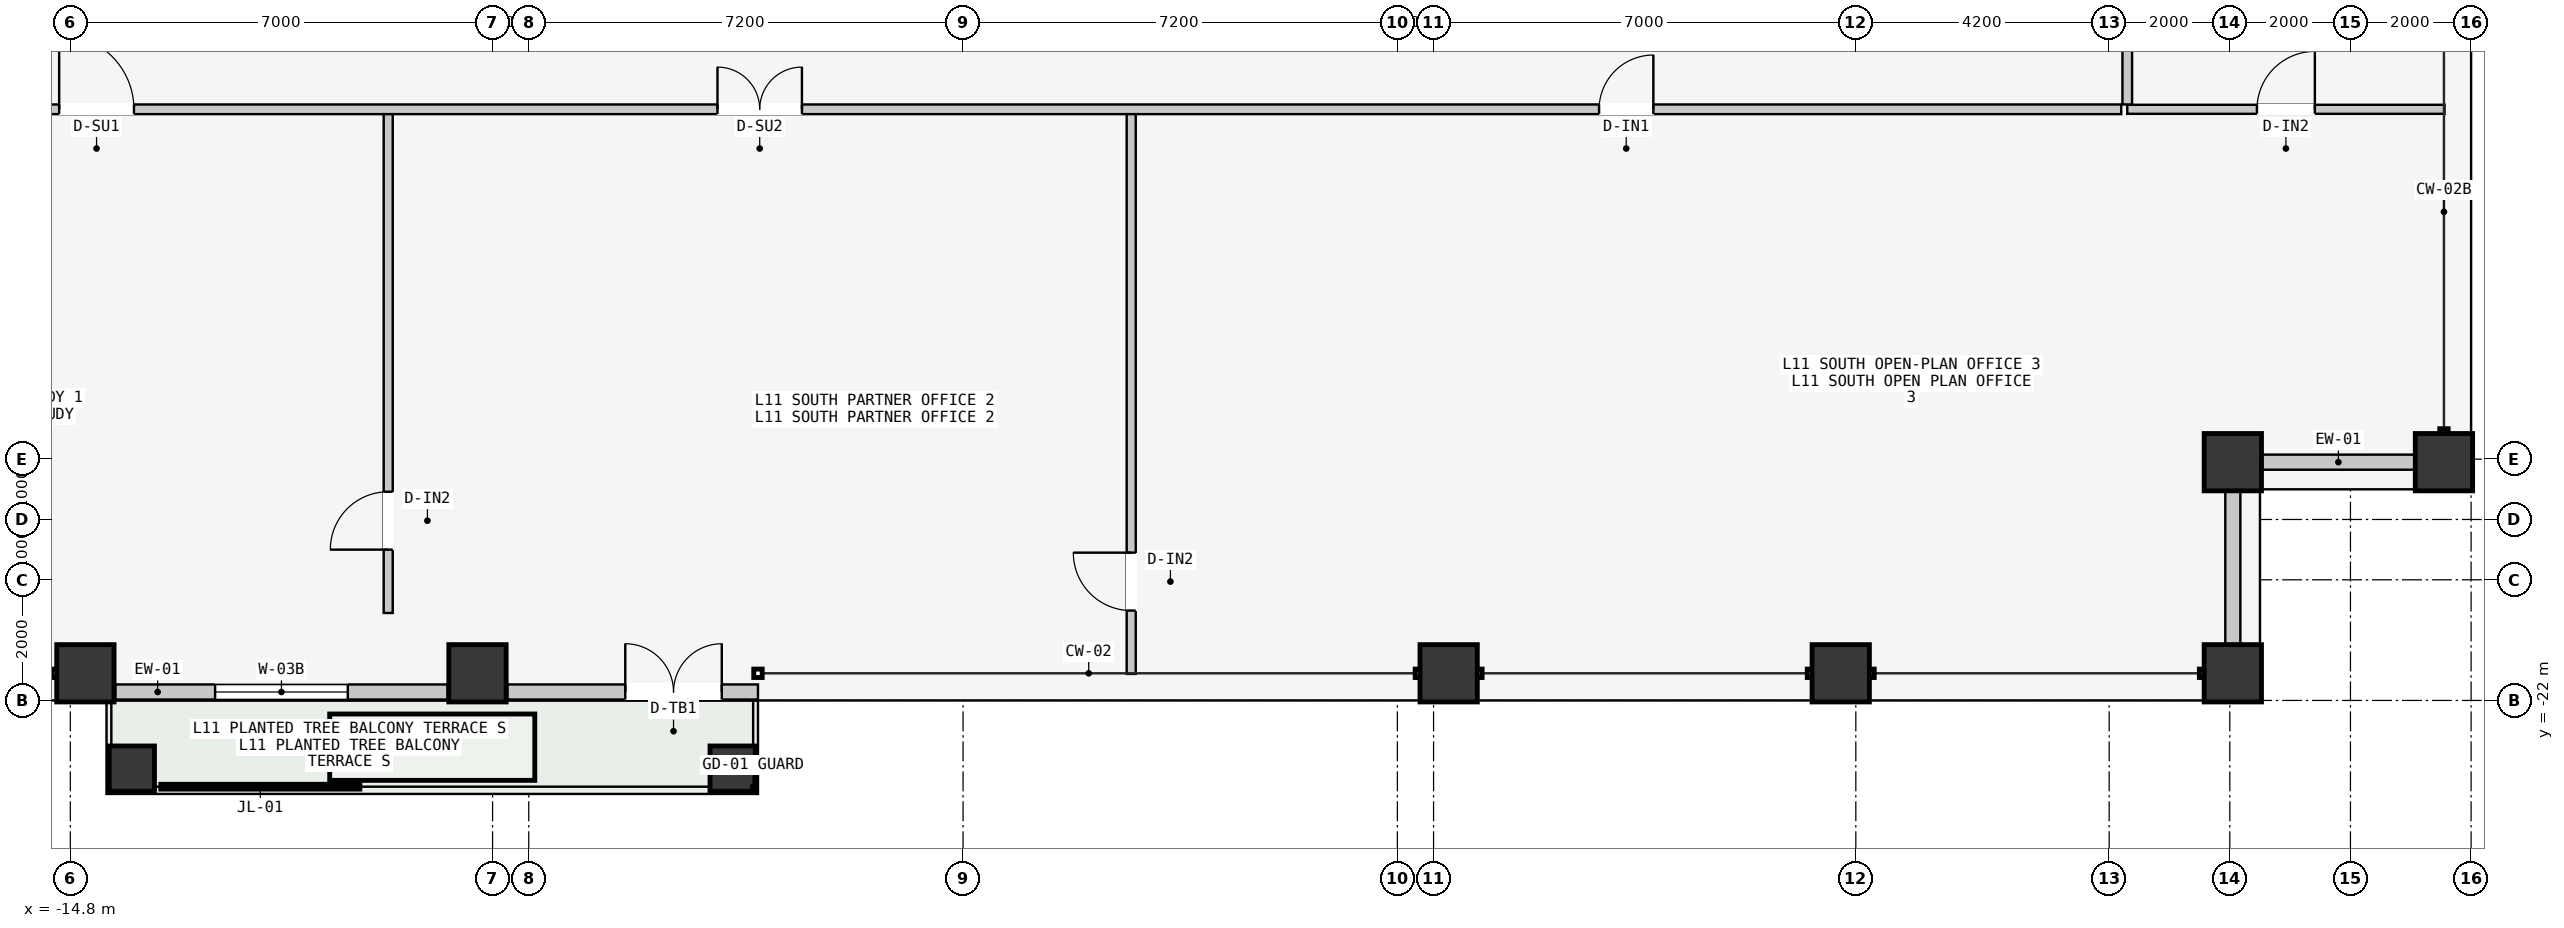
"""IFC4 building model, lengths in metres.
Left out: names, types, materials, properties, quantities, classifications, styles, units other than length and angle.
Written with IfcOpenShell. Run it as: python <this file> out.ifc"""

import sys

from ifc_helpers import new_model, si_unit, direction, frame, frame_2d, origin, origin_2d, place, context, subcontext, project, spatial, rectangle, hollow_rectangle, extrude, element, fill, save


model = new_model("IFC4")
c1 = context("Model", 3, precision=1e-05, world=origin(), true_north=direction((0.0, 1.0)))
c2 = subcontext(c1, "Body", "Model", "MODEL_VIEW")
j1 = project(units=[si_unit("LENGTHUNIT", "METRE"), si_unit("PLANEANGLEUNIT", "RADIAN")], contexts=[c1])
p1 = place(None, origin())
s1 = spatial("IfcSite", under=j1, at=p1, CompositionType="ELEMENT")
p2 = place(p1, origin())
s2 = spatial("IfcBuilding", under=s1, at=p2, CompositionType="ELEMENT")
p3 = place(p2, frame((0.0, 0.0, 45.6)))
s3 = spatial("IfcBuildingStorey", under=s2, at=p3, CompositionType="ELEMENT", Elevation=45.6)
for number, where, z_axis, x_axis in (
    (1, (-14.55, -21.55, 0.0), (0.0, 0.0, 1.0), (1.0, 0.0, 0.0)),
    (2, (-8.05, -21.55, 0.0), (0.0, 0.0, 1.0), (1.0, 0.0, 0.0)),
    (3, (8.05, -21.55, 0.0), (0.0, 0.0, 1.0), (1.0, 0.0, 0.0)),
    (4, (14.55, -21.55, 0.0), (0.0, 0.0, 1.0), (1.0, 0.0, 0.0)),
    (5, (21.05, -21.55, 0.0), (0.0, 0.0, 1.0), (1.0, 0.0, 0.0)),
    (6, (24.55, -18.05, 0.0), (0.0, 0.0, 1.0), (0.0, 1.0, 0.0)),
    (7, (21.05, -18.05, 0.0), (0.0, 0.0, 1.0), (1.0, 0.0, 0.0)),
):
    element("IfcColumn", number, at=place(p3, frame(where, z_axis=z_axis, x_axis=x_axis)), inside=s3, PredefinedType="COLUMN", context=c2, shape_type="SweptSolid", body=[
        extrude(hollow_rectangle(XDim=0.95, YDim=0.95, WallThickness=0.048, at=origin_2d()), origin(), (0.0, 0.0, 1.0), 3.6),
    ])
for number, where, z_axis, x_axis in (
    (8, (-13.78, -23.13, 0.0), (0.0, 0.0, 1.0), (1.0, 0.0, 0.0)),
    (9, (-3.82, -23.13, 0.0), (0.0, 0.0, 1.0), (1.0, 0.0, 0.0)),
):
    element("IfcColumn", number, at=place(p3, frame(where, z_axis=z_axis, x_axis=x_axis)), inside=s3, PredefinedType="COLUMN", context=c2, shape_type="SweptSolid", body=[
        extrude(hollow_rectangle(XDim=0.75, YDim=0.75, WallThickness=0.032, at=origin_2d()), origin(), (0.0, 0.0, 1.0), 3.6),
    ])
p4 = place(p3, frame((-14.055, -21.86, 0.0), z_axis=(0.0, 0.0, 1.0), x_axis=(1.0, 0.0, 0.0)))
e10 = element("IfcWall", 10, at=p4, inside=s3, PredefinedType="STANDARD", context=c2, shape_type="SweptSolid", body=[
    extrude(rectangle(XDim=5.51, YDim=0.25, at=frame_2d((2.755, 0.0))), origin(), (0.0, 0.0, 1.0), 3.4),
])
p5 = place(p4, frame((1.655, 0.0, 0.85)))
e11 = element("IfcOpeningElement", 11, at=p5, cuts=e10, PredefinedType="OPENING", context=c2, shape_type="SweptSolid", body=[
    extrude(rectangle(XDim=2.2, YDim=2.1, at=frame_2d((1.1, 1.05))), frame((0.0, 0.135, 0.0), z_axis=(0.0, -1.0, 0.0), x_axis=(1.0, 0.0, 0.0)), (0.0, 0.0, 1.0), 0.27),
])
p6 = place(p3, frame((-7.555, -21.86, 0.0), z_axis=(0.0, 0.0, 1.0), x_axis=(1.0, 0.0, 0.0)))
e12 = element("IfcWall", 12, at=p6, inside=s3, PredefinedType="STANDARD", context=c2, shape_type="SweptSolid", body=[
    extrude(rectangle(XDim=4.155, YDim=0.25, at=frame_2d((2.078, 0.0))), origin(), (0.0, 0.0, 1.0), 3.4),
])
p7 = place(p6, frame((1.955, 0.0, 0.0)))
e13 = element("IfcOpeningElement", 13, at=p7, cuts=e12, PredefinedType="OPENING", context=c2, shape_type="SweptSolid", body=[
    extrude(rectangle(XDim=1.6, YDim=2.2, at=frame_2d((0.8, 1.1))), frame((0.0, 0.135, 0.0), z_axis=(0.0, -1.0, 0.0), x_axis=(1.0, 0.0, 0.0)), (0.0, 0.0, 1.0), 0.27),
])
for number, where, z_axis, x_axis in (
    (14, (21.535, -18.05, 0.0), (0.0, 0.0, 1.0), (1.0, 0.0, 0.0)),
    (15, (21.05, -21.065, 0.0), (0.0, 0.0, 1.0), (0.0, 1.0, 0.0)),
):
    element("IfcWall", number, at=place(p3, frame(where, z_axis=z_axis, x_axis=x_axis)), inside=s3, PredefinedType="STANDARD", context=c2, shape_type="SweptSolid", body=[
        extrude(rectangle(XDim=2.53, YDim=0.25, at=frame_2d((1.265, 0.0))), origin(), (0.0, 0.0, 1.0), 2.7),
    ])
p8 = place(p3, frame((-9.53, -20.55, 0.0), z_axis=(0.0, 0.0, 1.0), x_axis=(0.0, 1.0, 0.0)))
e16 = element("IfcWall", 16, at=p8, inside=s3, PredefinedType="PARTITIONING", context=c2, shape_type="SweptSolid", body=[
    extrude(rectangle(XDim=8.29, YDim=0.15, at=frame_2d((4.145, 0.0))), origin(), (0.0, 0.0, 1.0), 3.4),
])
p9 = place(p8, frame((1.05, 0.0, 0.0)))
e17 = element("IfcOpeningElement", 17, at=p9, cuts=e16, PredefinedType="OPENING", context=c2, shape_type="SweptSolid", body=[
    extrude(rectangle(XDim=0.96, YDim=2.18, at=frame_2d((0.48, 1.09))), frame((0.0, 0.085, 0.0), z_axis=(0.0, -1.0, 0.0), x_axis=(1.0, 0.0, 0.0)), (0.0, 0.0, 1.0), 0.17),
])
p10 = place(p3, frame((2.787, -21.56, 0.0), z_axis=(0.0, 0.0, 1.0), x_axis=(0.0, 1.0, 0.0)))
e18 = element("IfcWall", 18, at=p10, inside=s3, PredefinedType="PARTITIONING", context=c2, shape_type="SweptSolid", body=[
    extrude(rectangle(XDim=9.3, YDim=0.15, at=frame_2d((4.65, 0.0))), origin(), (0.0, 0.0, 1.0), 3.4),
])
p11 = place(p10, frame((1.05, 0.0, 0.0)))
e19 = element("IfcOpeningElement", 19, at=p11, cuts=e18, PredefinedType="OPENING", context=c2, shape_type="SweptSolid", body=[
    extrude(rectangle(XDim=0.96, YDim=2.18, at=frame_2d((0.48, 1.09))), frame((0.0, 0.085, 0.0), z_axis=(0.0, -1.0, 0.0), x_axis=(1.0, 0.0, 0.0)), (0.0, 0.0, 1.0), 0.17),
])
p12 = place(p3, frame((-19.2, -12.2, 0.0), z_axis=(0.0, 0.0, 1.0), x_axis=(1.0, 0.0, 0.0)))
e20 = element("IfcWall", 20, at=p12, inside=s3, PredefinedType="PARTITIONING", context=c2, shape_type="SweptSolid", body=[
    extrude(rectangle(XDim=38.4, YDim=0.16, at=frame_2d((19.2, 0.0))), origin(), (0.0, 0.0, 1.0), 3.4),
])
p13 = place(p12, frame((4.215, 0.0, 0.0)))
e21 = element("IfcOpeningElement", 21, at=p13, cuts=e20, PredefinedType="OPENING", context=c2, shape_type="SweptSolid", body=[
    extrude(rectangle(XDim=1.24, YDim=2.24, at=frame_2d((0.62, 1.12))), frame((0.0, 0.09, 0.0), z_axis=(0.0, -1.0, 0.0), x_axis=(1.0, 0.0, 0.0)), (0.0, 0.0, 1.0), 0.18),
])
p14 = place(p12, frame((15.129, 0.0, 0.0)))
e22 = element("IfcOpeningElement", 22, at=p14, cuts=e20, PredefinedType="OPENING", context=c2, shape_type="SweptSolid", body=[
    extrude(rectangle(XDim=1.4, YDim=2.2, at=frame_2d((0.7, 1.1))), frame((0.0, 0.09, 0.0), z_axis=(0.0, -1.0, 0.0), x_axis=(1.0, 0.0, 0.0)), (0.0, 0.0, 1.0), 0.18),
])
p15 = place(p12, frame((29.744, 0.0, 0.0)))
e23 = element("IfcOpeningElement", 23, at=p15, cuts=e20, PredefinedType="OPENING", context=c2, shape_type="SweptSolid", body=[
    extrude(rectangle(XDim=0.9, YDim=2.15, at=frame_2d((0.45, 1.075))), frame((0.0, 0.09, 0.0), z_axis=(0.0, -1.0, 0.0), x_axis=(1.0, 0.0, 0.0)), (0.0, 0.0, 1.0), 0.18),
])
p16 = place(p3, frame((19.3, -12.2, 0.0), z_axis=(0.0, 0.0, 1.0), x_axis=(1.0, 0.0, 0.0)))
e24 = element("IfcWall", 24, at=p16, inside=s3, PredefinedType="PARTITIONING", context=c2, shape_type="SweptSolid", body=[
    extrude(rectangle(XDim=5.26, YDim=0.15, at=frame_2d((2.63, 0.0))), origin(), (0.0, 0.0, 1.0), 3.4),
])
p17 = place(p16, frame((2.15, 0.0, 0.0)))
e25 = element("IfcOpeningElement", 25, at=p17, cuts=e24, PredefinedType="OPENING", context=c2, shape_type="SweptSolid", body=[
    extrude(rectangle(XDim=0.96, YDim=2.18, at=frame_2d((0.48, 1.09))), frame((0.0, 0.085, 0.0), z_axis=(0.0, -1.0, 0.0), x_axis=(1.0, 0.0, 0.0)), (0.0, 0.0, 1.0), 0.17),
])
p18 = place(p3, frame((19.3, -12.12, 0.0), z_axis=(0.0, 0.0, 1.0), x_axis=(0.0, 1.0, 0.0)))
e26 = element("IfcWall", 26, at=p18, inside=s3, PredefinedType="PARTITIONING", context=c2, shape_type="SweptSolid", body=[
    extrude(rectangle(XDim=26.54, YDim=0.16, at=frame_2d((13.27, 0.0))), origin(), (0.0, 0.0, 1.0), 3.4),
])
p19 = place(p18, frame((5.063, 0.0, 0.0)))
e27 = element("IfcOpeningElement", 27, at=p19, cuts=e26, PredefinedType="OPENING", context=c2, shape_type="SweptSolid", body=[
    extrude(rectangle(XDim=1.02, YDim=2.2, at=frame_2d((0.51, 1.1))), frame((0.0, 0.09, 0.0), z_axis=(0.0, -1.0, 0.0), x_axis=(1.0, 0.0, 0.0)), (0.0, 0.0, 1.0), 0.18),
])
p20 = place(p18, frame((18.313, 0.0, 0.0)))
e28 = element("IfcOpeningElement", 28, at=p20, cuts=e26, PredefinedType="OPENING", context=c2, shape_type="SweptSolid", body=[
    extrude(rectangle(XDim=1.06, YDim=2.2, at=frame_2d((0.53, 1.1))), frame((0.0, 0.09, 0.0), z_axis=(0.0, -1.0, 0.0), x_axis=(1.0, 0.0, 0.0)), (0.0, 0.0, 1.0), 0.18),
])
p21 = place(p5, origin())
e29 = element("IfcWindow", 29, at=p21, inside=s3, PartitioningType="SINGLE_PANEL", PredefinedType="WINDOW", context=c2, shape_type="SweptSolid", body=[
    extrude(rectangle(XDim=2.2, YDim=2.1, at=frame_2d((1.1, 1.05))), frame((0.0, 0.03, 0.0), z_axis=(0.0, -1.0, 0.0), x_axis=(1.0, 0.0, 0.0)), (0.0, 0.0, 1.0), 0.06),
])
fill(e11, e29)
p22 = place(p7, origin())
e30 = element("IfcDoor", 30, at=p22, inside=s3, OperationType="DOUBLE_DOOR_SINGLE_SWING", PredefinedType="DOOR", context=c2, shape_type="SweptSolid", body=[
    extrude(rectangle(XDim=1.6, YDim=2.2, at=frame_2d((0.8, 1.1))), frame((0.0, 0.025, 0.0), z_axis=(0.0, -1.0, 0.0), x_axis=(1.0, 0.0, 0.0)), (0.0, 0.0, 1.0), 0.05),
])
fill(e13, e30)
p23 = place(p9, origin())
e31 = element("IfcDoor", 31, at=p23, inside=s3, OperationType="SINGLE_SWING_LEFT", PredefinedType="DOOR", context=c2, shape_type="SweptSolid", body=[
    extrude(rectangle(XDim=0.96, YDim=2.18, at=frame_2d((0.48, 1.09))), frame((0.0, 0.025, 0.0), z_axis=(0.0, -1.0, 0.0), x_axis=(1.0, 0.0, 0.0)), (0.0, 0.0, 1.0), 0.05),
])
fill(e17, e31)
p24 = place(p11, origin())
e32 = element("IfcDoor", 32, at=p24, inside=s3, OperationType="SINGLE_SWING_RIGHT", PredefinedType="DOOR", context=c2, shape_type="SweptSolid", body=[
    extrude(rectangle(XDim=0.96, YDim=2.18, at=frame_2d((0.48, 1.09))), frame((0.0, 0.025, 0.0), z_axis=(0.0, -1.0, 0.0), x_axis=(1.0, 0.0, 0.0)), (0.0, 0.0, 1.0), 0.05),
])
fill(e19, e32)
p25 = place(p13, origin())
e33 = element("IfcDoor", 33, at=p25, inside=s3, OperationType="SINGLE_SWING_LEFT", PredefinedType="DOOR", context=c2, shape_type="SweptSolid", body=[
    extrude(rectangle(XDim=1.24, YDim=2.24, at=frame_2d((0.62, 1.12))), frame((0.0, 0.025, 0.0), z_axis=(0.0, -1.0, 0.0), x_axis=(1.0, 0.0, 0.0)), (0.0, 0.0, 1.0), 0.05),
])
fill(e21, e33)
p26 = place(p14, origin())
e34 = element("IfcDoor", 34, at=p26, inside=s3, OperationType="DOUBLE_DOOR_SINGLE_SWING", PredefinedType="DOOR", context=c2, shape_type="SweptSolid", body=[
    extrude(rectangle(XDim=1.4, YDim=2.2, at=frame_2d((0.7, 1.1))), frame((0.0, 0.025, 0.0), z_axis=(0.0, -1.0, 0.0), x_axis=(1.0, 0.0, 0.0)), (0.0, 0.0, 1.0), 0.05),
])
fill(e22, e34)
p27 = place(p15, origin())
e35 = element("IfcDoor", 35, at=p27, inside=s3, OperationType="SINGLE_SWING_RIGHT", PredefinedType="DOOR", context=c2, shape_type="SweptSolid", body=[
    extrude(rectangle(XDim=0.9, YDim=2.15, at=frame_2d((0.45, 1.075))), frame((0.0, 0.025, 0.0), z_axis=(0.0, -1.0, 0.0), x_axis=(1.0, 0.0, 0.0)), (0.0, 0.0, 1.0), 0.05),
])
fill(e23, e35)
p28 = place(p17, origin())
e36 = element("IfcDoor", 36, at=p28, inside=s3, OperationType="SINGLE_SWING_RIGHT", PredefinedType="DOOR", context=c2, shape_type="SweptSolid", body=[
    extrude(rectangle(XDim=0.96, YDim=2.18, at=frame_2d((0.48, 1.09))), frame((0.0, 0.025, 0.0), z_axis=(0.0, -1.0, 0.0), x_axis=(1.0, 0.0, 0.0)), (0.0, 0.0, 1.0), 0.05),
])
fill(e25, e36)
save(model, sys.argv[1])
